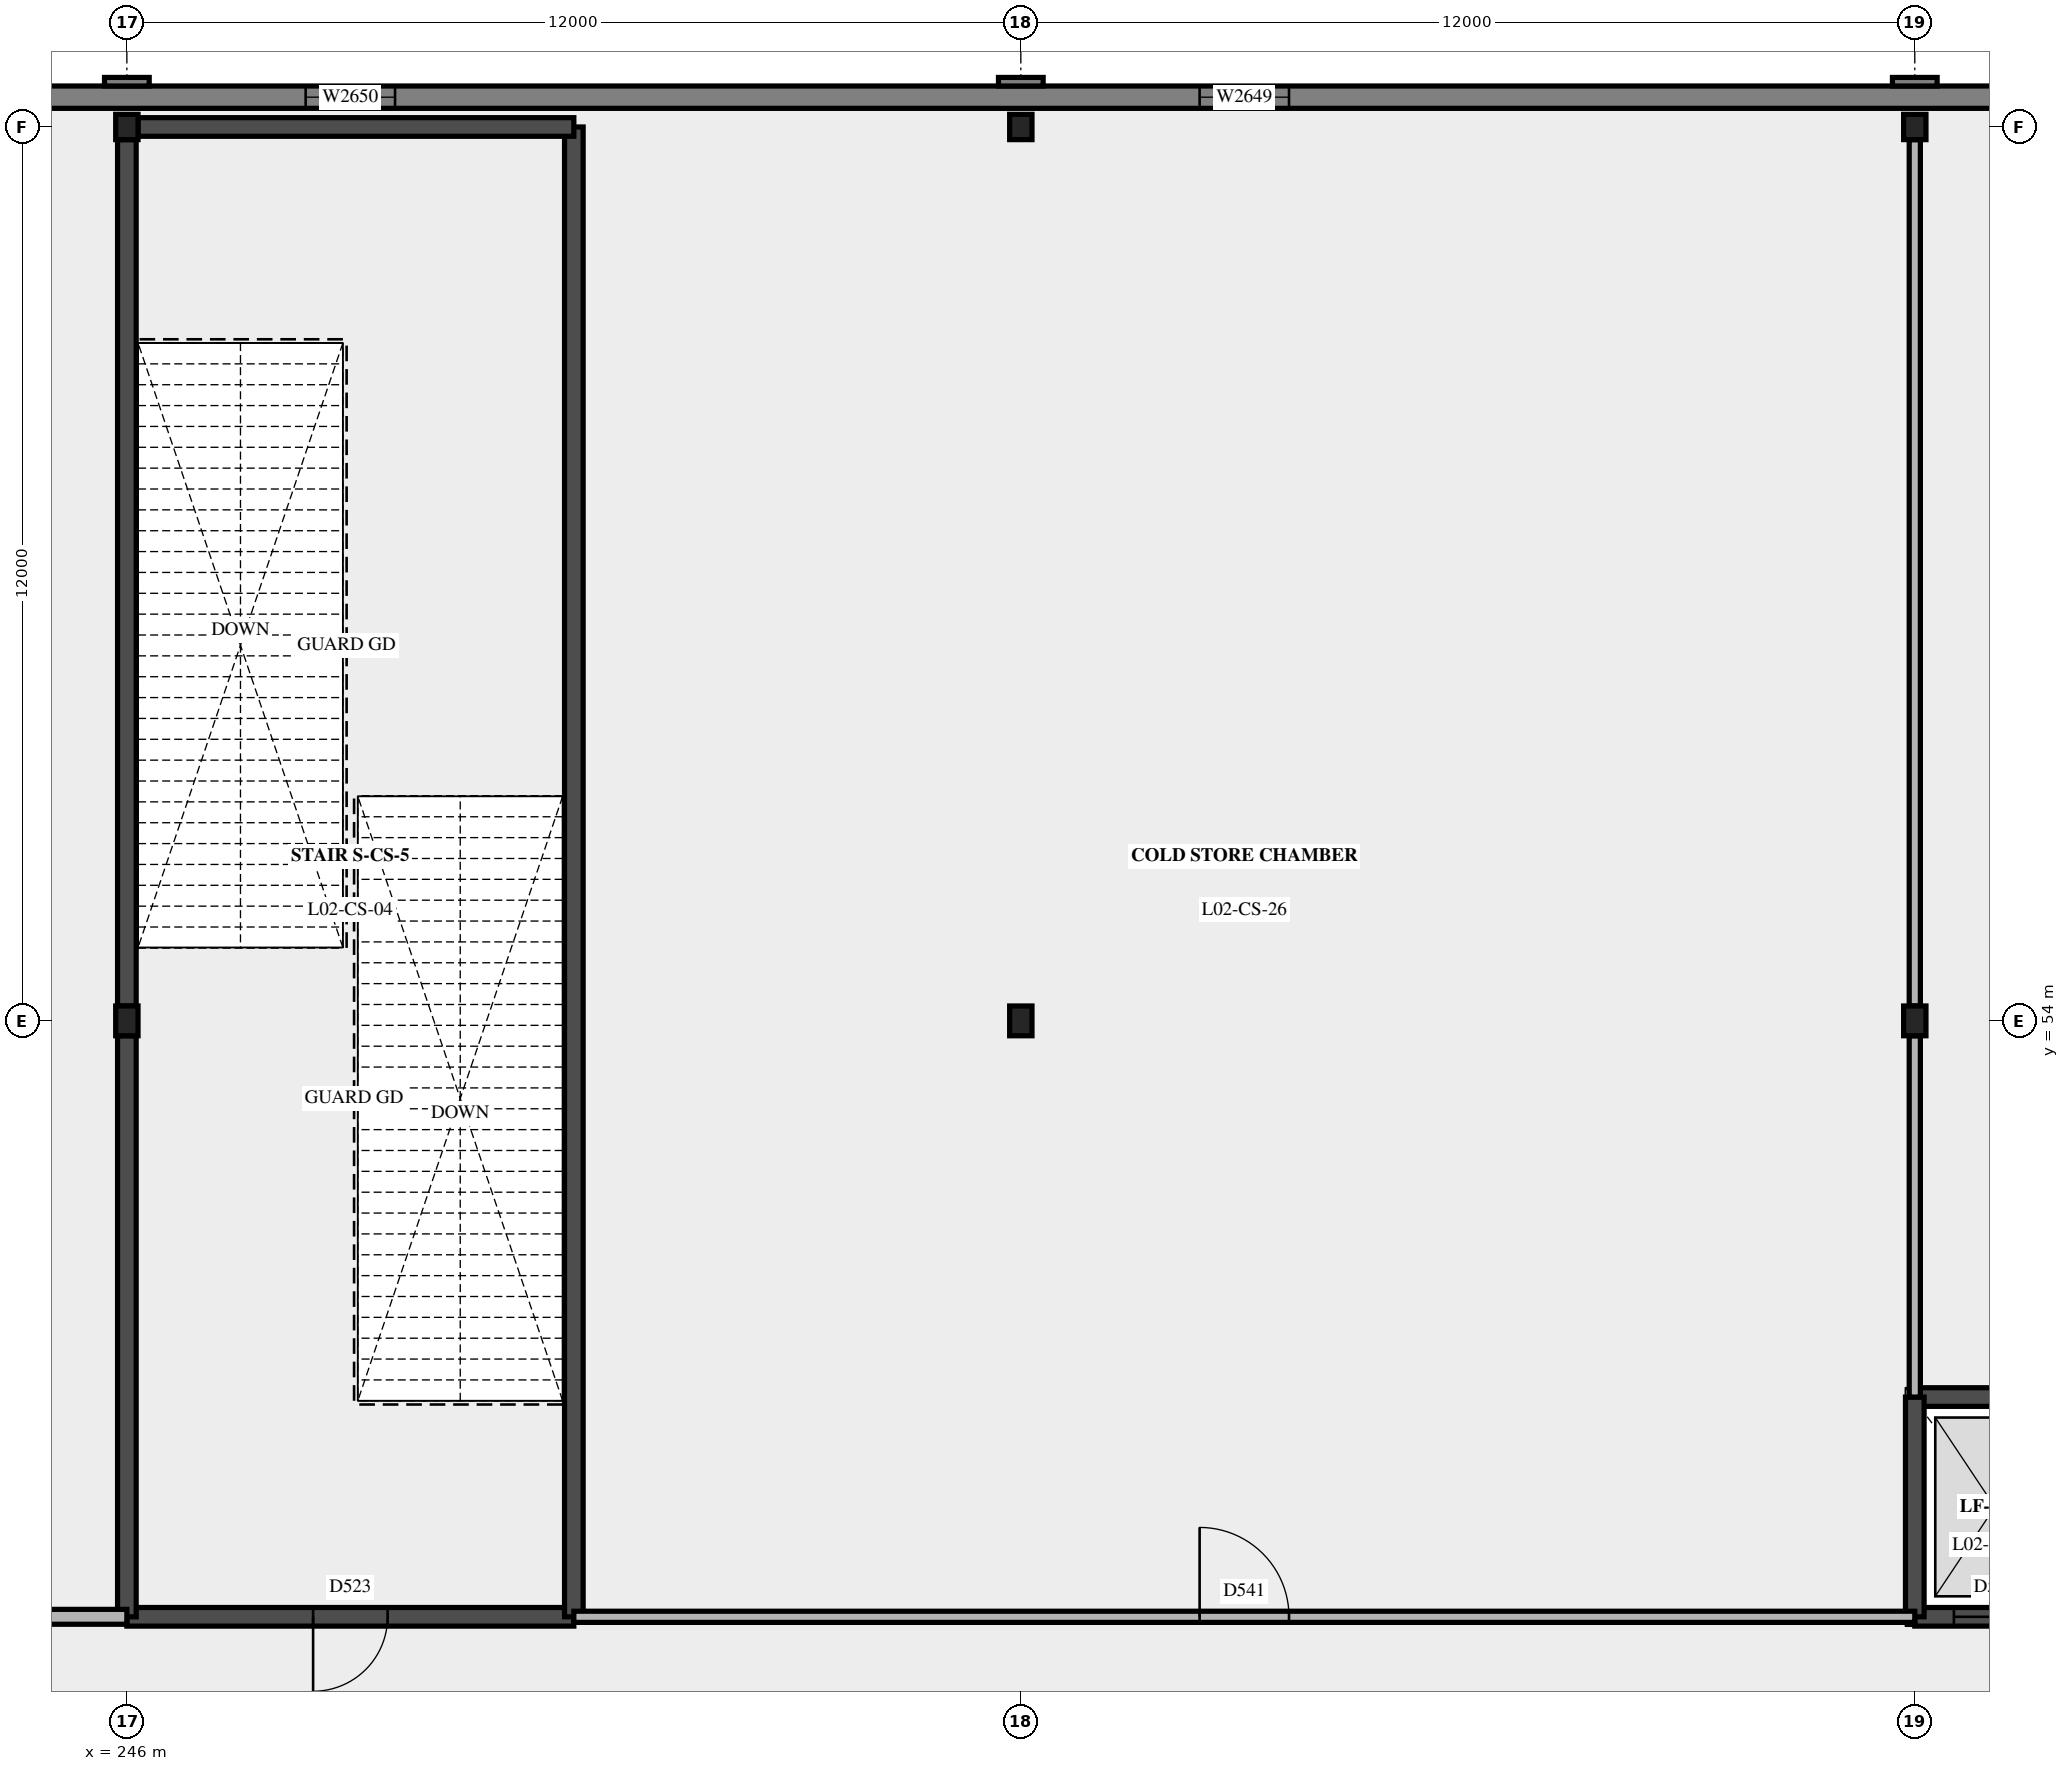
"""IFC4 building model, lengths in metres.
Left out: names, types, materials, properties, quantities, classifications, styles, units other than length and angle.
Written with IfcOpenShell. Run it as: python <this file> out.ifc"""

import sys

from ifc_helpers import new_model, si_unit, direction, frame, frame_2d, origin, origin_2d, place, context, subcontext, project, spatial, polyline, rectangle, i_section, outline, extrude, element, fill, save


model = new_model("IFC4")
c1 = context("Model", 3, precision=1e-05, world=origin(), true_north=direction((0.0, 1.0)))
c2 = subcontext(c1, "Body", "Model", "MODEL_VIEW")
j1 = project(units=[si_unit("LENGTHUNIT", "METRE"), si_unit("PLANEANGLEUNIT", "RADIAN")], contexts=[c1])
p1 = place(None, origin())
s1 = spatial("IfcSite", under=j1, at=p1, CompositionType="ELEMENT")
p2 = place(p1, origin())
s2 = spatial("IfcBuilding", under=s1, at=p2, CompositionType="ELEMENT")
p3 = place(p2, frame((0.0, 0.0, 10.8)))
s3 = spatial("IfcBuildingStorey", under=s2, at=p3, CompositionType="ELEMENT", Elevation=10.8)
p4 = place(p3, frame((246.0, 54.0, 0.0), z_axis=(0.0, 0.0, 1.0), x_axis=(1.0, 0.0, 0.0)))
e1 = element("IfcColumn", 1, at=p4, inside=s3, PredefinedType="COLUMN", context=c2, shape_type="SweptSolid", body=[
    extrude(i_section(OverallWidth=0.3, OverallDepth=0.4, WebThickness=0.013, FlangeThickness=0.024, at=origin_2d()), origin(), (0.0, 0.0, 1.0), 5.4),
])
p5 = place(p3, frame((246.0, 66.0, 0.0), z_axis=(0.0, 0.0, 1.0), x_axis=(1.0, 0.0, 0.0)))
e2 = element("IfcColumn", 2, at=p5, inside=s3, PredefinedType="COLUMN", context=c2, shape_type="SweptSolid", body=[
    extrude(i_section(OverallWidth=0.3, OverallDepth=0.34, WebThickness=0.012, FlangeThickness=0.021, at=origin_2d()), origin(), (0.0, 0.0, 1.0), 5.4),
])
p6 = place(p3, frame((258.0, 54.0, 0.0), z_axis=(0.0, 0.0, 1.0), x_axis=(1.0, 0.0, 0.0)))
e3 = element("IfcColumn", 3, at=p6, inside=s3, PredefinedType="COLUMN", context=c2, shape_type="SweptSolid", body=[
    extrude(i_section(OverallWidth=0.3, OverallDepth=0.4, WebThickness=0.013, FlangeThickness=0.024, at=origin_2d()), origin(), (0.0, 0.0, 1.0), 5.4),
])
p7 = place(p3, frame((258.0, 66.0, 0.0), z_axis=(0.0, 0.0, 1.0), x_axis=(1.0, 0.0, 0.0)))
e4 = element("IfcColumn", 4, at=p7, inside=s3, PredefinedType="COLUMN", context=c2, shape_type="SweptSolid", body=[
    extrude(i_section(OverallWidth=0.3, OverallDepth=0.34, WebThickness=0.012, FlangeThickness=0.021, at=origin_2d()), origin(), (0.0, 0.0, 1.0), 5.4),
])
p8 = place(p3, frame((270.0, 54.0, 0.0), z_axis=(0.0, 0.0, 1.0), x_axis=(1.0, 0.0, 0.0)))
e5 = element("IfcColumn", 5, at=p8, inside=s3, PredefinedType="COLUMN", context=c2, shape_type="SweptSolid", body=[
    extrude(i_section(OverallWidth=0.3, OverallDepth=0.4, WebThickness=0.013, FlangeThickness=0.024, at=origin_2d()), origin(), (0.0, 0.0, 1.0), 5.4),
])
p9 = place(p3, frame((270.0, 66.0, 0.0), z_axis=(0.0, 0.0, 1.0), x_axis=(1.0, 0.0, 0.0)))
e6 = element("IfcColumn", 6, at=p9, inside=s3, PredefinedType="COLUMN", context=c2, shape_type="SweptSolid", body=[
    extrude(i_section(OverallWidth=0.3, OverallDepth=0.34, WebThickness=0.012, FlangeThickness=0.021, at=origin_2d()), origin(), (0.0, 0.0, 1.0), 5.4),
])
p10 = place(p3, frame((246.0, 46.0, 0.0), z_axis=(0.0, 0.0, 1.0), x_axis=(1.0, 0.0, 0.0)))
e7 = element("IfcWall", 7, at=p10, inside=s3, PredefinedType="SHEAR", context=c2, shape_type="SweptSolid", body=[
    extrude(rectangle(XDim=6.0, YDim=0.25, at=frame_2d((3.0, 0.0))), origin(), (0.0, 0.0, 1.0), 5.15),
])
p11 = place(p10, frame((2.5, 0.0, 0.0)))
e8 = element("IfcOpeningElement", 8, at=p11, cuts=e7, PredefinedType="OPENING", context=c2, shape_type="SweptSolid", body=[
    extrude(rectangle(XDim=1.0, YDim=2.1, at=frame_2d((0.5, 1.05))), frame((0.0, 0.135, 0.0), z_axis=(0.0, -1.0, 0.0), x_axis=(1.0, 0.0, 0.0)), (0.0, 0.0, 1.0), 0.27),
])
p12 = place(p3, frame((252.0, 46.0, 0.0), z_axis=(0.0, 0.0, 1.0), x_axis=(0.0, 1.0, 0.0)))
e9 = element("IfcWall", 9, at=p12, inside=s3, PredefinedType="SHEAR", context=c2, shape_type="SweptSolid", body=[
    extrude(rectangle(XDim=20.0, YDim=0.25, at=frame_2d((10.0, 0.0))), origin(), (0.0, 0.0, 1.0), 5.15),
])
p13 = place(p3, frame((246.15, 66.0, 0.0), z_axis=(0.0, 0.0, 1.0), x_axis=(1.0, 0.0, 0.0)))
e10 = element("IfcWall", 10, at=p13, inside=s3, PredefinedType="SHEAR", context=c2, shape_type="SweptSolid", body=[
    extrude(rectangle(XDim=5.85, YDim=0.25, at=frame_2d((2.925, 0.0))), origin(), (0.0, 0.0, 1.0), 5.15),
])
p14 = place(p3, frame((246.0, 46.0, 0.0), z_axis=(0.0, 0.0, 1.0), x_axis=(0.0, 1.0, 0.0)))
e11 = element("IfcWall", 11, at=p14, inside=s3, PredefinedType="SHEAR", context=c2, shape_type="SweptSolid", body=[
    extrude(rectangle(XDim=7.8, YDim=0.25, at=frame_2d((3.9, 0.0))), origin(), (0.0, 0.0, 1.0), 5.15),
])
p15 = place(p3, frame((246.0, 54.2, 0.0), z_axis=(0.0, 0.0, 1.0), x_axis=(0.0, 1.0, 0.0)))
e12 = element("IfcWall", 12, at=p15, inside=s3, PredefinedType="SHEAR", context=c2, shape_type="SweptSolid", body=[
    extrude(rectangle(XDim=11.63, YDim=0.25, at=frame_2d((5.815, 0.0))), origin(), (0.0, 0.0, 1.0), 5.15),
])
p16 = place(p3, frame((282.25, 66.4, 0.0), z_axis=(0.0, 0.0, 1.0), x_axis=(-1.0, 0.0, 0.0)))
e13 = element("IfcWall", 13, at=p16, inside=s3, PredefinedType="SOLIDWALL", context=c2, shape_type="SweptSolid", body=[
    extrude(rectangle(XDim=84.5, YDim=0.3, at=frame_2d((42.25, 0.0))), origin(), (0.0, 0.0, 1.0), 5.4),
])
p17 = place(p16, frame((8.65, 0.0, 1.2)))
e14 = element("IfcOpeningElement", 14, at=p17, cuts=e13, PredefinedType="OPENING", context=c2, shape_type="SweptSolid", body=[
    extrude(rectangle(XDim=1.2, YDim=1.5, at=frame_2d((0.6, 0.75))), frame((0.0, 0.16, 0.0), z_axis=(0.0, -1.0, 0.0), x_axis=(1.0, 0.0, 0.0)), (0.0, 0.0, 1.0), 0.32),
])
p18 = place(p16, frame((20.65, 0.0, 1.2)))
e15 = element("IfcOpeningElement", 15, at=p18, cuts=e13, PredefinedType="OPENING", context=c2, shape_type="SweptSolid", body=[
    extrude(rectangle(XDim=1.2, YDim=1.5, at=frame_2d((0.6, 0.75))), frame((0.0, 0.16, 0.0), z_axis=(0.0, -1.0, 0.0), x_axis=(1.0, 0.0, 0.0)), (0.0, 0.0, 1.0), 0.32),
])
p19 = place(p16, frame((32.65, 0.0, 1.2)))
e16 = element("IfcOpeningElement", 16, at=p19, cuts=e13, PredefinedType="OPENING", context=c2, shape_type="SweptSolid", body=[
    extrude(rectangle(XDim=1.2, YDim=1.5, at=frame_2d((0.6, 0.75))), frame((0.0, 0.16, 0.0), z_axis=(0.0, -1.0, 0.0), x_axis=(1.0, 0.0, 0.0)), (0.0, 0.0, 1.0), 0.32),
])
p20 = place(p16, frame((44.65, 0.0, 1.2)))
e17 = element("IfcOpeningElement", 17, at=p20, cuts=e13, PredefinedType="OPENING", context=c2, shape_type="SweptSolid", body=[
    extrude(rectangle(XDim=1.2, YDim=1.5, at=frame_2d((0.6, 0.75))), frame((0.0, 0.16, 0.0), z_axis=(0.0, -1.0, 0.0), x_axis=(1.0, 0.0, 0.0)), (0.0, 0.0, 1.0), 0.32),
])
p21 = place(p16, frame((56.65, 0.0, 1.2)))
e18 = element("IfcOpeningElement", 18, at=p21, cuts=e13, PredefinedType="OPENING", context=c2, shape_type="SweptSolid", body=[
    extrude(rectangle(XDim=1.2, YDim=1.5, at=frame_2d((0.6, 0.75))), frame((0.0, 0.16, 0.0), z_axis=(0.0, -1.0, 0.0), x_axis=(1.0, 0.0, 0.0)), (0.0, 0.0, 1.0), 0.32),
])
p22 = place(p16, frame((68.65, 0.0, 1.2)))
e19 = element("IfcOpeningElement", 19, at=p22, cuts=e13, PredefinedType="OPENING", context=c2, shape_type="SweptSolid", body=[
    extrude(rectangle(XDim=1.2, YDim=1.5, at=frame_2d((0.6, 0.75))), frame((0.0, 0.16, 0.0), z_axis=(0.0, -1.0, 0.0), x_axis=(1.0, 0.0, 0.0)), (0.0, 0.0, 1.0), 0.32),
])
p23 = place(p16, frame((80.65, 0.0, 1.2)))
e20 = element("IfcOpeningElement", 20, at=p23, cuts=e13, PredefinedType="OPENING", context=c2, shape_type="SweptSolid", body=[
    extrude(rectangle(XDim=1.2, YDim=1.5, at=frame_2d((0.6, 0.75))), frame((0.0, 0.16, 0.0), z_axis=(0.0, -1.0, 0.0), x_axis=(1.0, 0.0, 0.0)), (0.0, 0.0, 1.0), 0.32),
])
for number, where, z_axis, x_axis in (
    (21, (270.3, 66.607, 0.0), (0.0, 0.0, 1.0), (-1.0, 0.0, 0.0)),
    (22, (258.3, 66.607, 0.0), (0.0, 0.0, 1.0), (-1.0, 0.0, 0.0)),
    (23, (246.3, 66.607, 0.0), (0.0, 0.0, 1.0), (-1.0, 0.0, 0.0)),
):
    element("IfcWall", number, at=place(p3, frame(where, z_axis=z_axis, x_axis=x_axis)), inside=s3, PredefinedType="SOLIDWALL", context=c2, shape_type="SweptSolid", body=[
        extrude(rectangle(XDim=0.6, YDim=0.115, at=frame_2d((0.3, 0.0))), origin(), (0.0, 0.0, 1.0), 5.4),
    ])
p24 = place(p3, frame((272.15, 48.95, 0.0), z_axis=(0.0, 0.0, 1.0), x_axis=(-1.0, 0.0, 0.0)))
e24 = element("IfcWall", 24, at=p24, inside=s3, PredefinedType="SHEAR", context=c2, shape_type="SweptSolid", body=[
    extrude(rectangle(XDim=2.15, YDim=0.25, at=frame_2d((1.075, 0.0))), origin(), (0.0, 0.0, 1.0), 5.15),
])
p25 = place(p3, frame((270.0, 46.0, 0.0), z_axis=(0.0, 0.0, 1.0), x_axis=(1.0, 0.0, 0.0)))
e25 = element("IfcWall", 25, at=p25, inside=s3, PredefinedType="SHEAR", context=c2, shape_type="SweptSolid", body=[
    extrude(rectangle(XDim=2.15, YDim=0.25, at=frame_2d((1.075, 0.0))), origin(), (0.0, 0.0, 1.0), 5.15),
])
p26 = place(p25, frame((0.525, 0.0, 0.0)))
e26 = element("IfcOpeningElement", 26, at=p26, cuts=e25, PredefinedType="OPENING", context=c2, shape_type="SweptSolid", body=[
    extrude(rectangle(XDim=1.1, YDim=2.1, at=frame_2d((0.55, 1.05))), frame((0.0, 0.135, 0.0), z_axis=(0.0, -1.0, 0.0), x_axis=(1.0, 0.0, 0.0)), (0.0, 0.0, 1.0), 0.27),
])
p27 = place(p3, frame((270.0, 48.95, 0.0), z_axis=(0.0, 0.0, 1.0), x_axis=(0.0, -1.0, 0.0)))
e27 = element("IfcWall", 27, at=p27, inside=s3, PredefinedType="SHEAR", context=c2, shape_type="SweptSolid", body=[
    extrude(rectangle(XDim=2.95, YDim=0.25, at=frame_2d((1.475, 0.0))), origin(), (0.0, 0.0, 1.0), 5.15),
])
p28 = place(p3, frame((228.0, 46.0, 0.0), z_axis=(0.0, 0.0, 1.0), x_axis=(1.0, 0.0, 0.0)))
e28 = element("IfcWall", 28, at=p28, inside=s3, PredefinedType="PARTITIONING", context=c2, shape_type="SweptSolid", body=[
    extrude(outline(polyline([(0.0, 0.0), (18.0, 0.0), (18.0, 5.15), (15.705, 5.15), (15.7, 4.63), (15.5, 4.63), (15.495, 5.15), (13.305, 5.15), (13.3, 4.63), (13.1, 4.63), (13.095, 5.15), (10.905, 5.15), (10.9, 4.63), (10.7, 4.63), (10.695, 5.15), (8.505, 5.15), (8.5, 4.63), (8.3, 4.63), (8.295, 5.15), (6.1, 5.15), (6.095, 4.68), (5.905, 4.68), (5.9, 5.15), (3.705, 5.15), (3.7, 4.63), (3.5, 4.63), (3.495, 5.15), (1.305, 5.15), (1.3, 4.63), (1.1, 4.63), (1.095, 5.15), (0.0, 5.15), (0.0, 0.0)])), frame((0.0, 0.1, 0.0), z_axis=(0.0, -1.0, 0.0), x_axis=(1.0, 0.0, 0.0)), (0.0, 0.0, 1.0), 0.2),
])
p29 = place(p28, frame((8.1, 0.0, 0.0)))
e29 = element("IfcOpeningElement", 29, at=p29, cuts=e28, PredefinedType="OPENING", context=c2, shape_type="SweptSolid", body=[
    extrude(rectangle(XDim=1.8, YDim=2.1, at=frame_2d((0.9, 1.05))), frame((0.0, 0.11, 0.0), z_axis=(0.0, -1.0, 0.0), x_axis=(1.0, 0.0, 0.0)), (0.0, 0.0, 1.0), 0.22),
])
p30 = place(p3, frame((252.0, 46.0, 0.0), z_axis=(0.0, 0.0, 1.0), x_axis=(1.0, 0.0, 0.0)))
e30 = element("IfcWall", 30, at=p30, inside=s3, PredefinedType="PARTITIONING", context=c2, shape_type="SweptSolid", body=[
    extrude(outline(polyline([(0.0, 0.0), (18.0, 0.0), (18.0, 5.15), (15.705, 5.15), (15.7, 4.63), (15.5, 4.63), (15.495, 5.15), (13.305, 5.15), (13.3, 4.63), (13.1, 4.63), (13.095, 5.15), (10.905, 5.15), (10.9, 4.63), (10.7, 4.63), (10.695, 5.15), (8.505, 5.15), (8.5, 4.63), (8.3, 4.63), (8.295, 5.15), (6.1, 5.15), (6.095, 4.68), (5.905, 4.68), (5.9, 5.15), (3.705, 5.15), (3.7, 4.63), (3.5, 4.63), (3.495, 5.15), (1.305, 5.15), (1.3, 4.63), (1.1, 4.63), (1.095, 5.15), (0.0, 5.15), (0.0, 0.0)])), frame((0.0, 0.075, 0.0), z_axis=(0.0, -1.0, 0.0), x_axis=(1.0, 0.0, 0.0)), (0.0, 0.0, 1.0), 0.15),
])
p31 = place(p30, frame((8.4, 0.0, 0.0)))
e31 = element("IfcOpeningElement", 31, at=p31, cuts=e30, PredefinedType="OPENING", context=c2, shape_type="SweptSolid", body=[
    extrude(rectangle(XDim=1.2, YDim=2.4, at=frame_2d((0.6, 1.2))), frame((0.0, 0.085, 0.0), z_axis=(0.0, -1.0, 0.0), x_axis=(1.0, 0.0, 0.0)), (0.0, 0.0, 1.0), 0.17),
])
p32 = place(p3, frame((270.0, 48.95, 0.0), z_axis=(0.0, 0.0, 1.0), x_axis=(0.0, 1.0, 0.0)))
e32 = element("IfcWall", 32, at=p32, inside=s3, PredefinedType="PARTITIONING", context=c2, shape_type="SweptSolid", body=[
    extrude(rectangle(XDim=4.85, YDim=0.15, at=frame_2d((2.425, 0.0))), origin(), (0.0, 0.0, 1.0), 4.68),
])
p33 = place(p3, frame((270.0, 54.2, 0.0), z_axis=(0.0, 0.0, 1.0), x_axis=(0.0, 1.0, 0.0)))
e33 = element("IfcWall", 33, at=p33, inside=s3, PredefinedType="PARTITIONING", context=c2, shape_type="SweptSolid", body=[
    extrude(rectangle(XDim=11.63, YDim=0.15, at=frame_2d((5.815, 0.0))), origin(), (0.0, 0.0, 1.0), 4.68),
])
p34 = place(p18, origin())
e34 = element("IfcWindow", 34, at=p34, inside=s3, PartitioningType="SINGLE_PANEL", PredefinedType="WINDOW", context=c2, shape_type="SweptSolid", body=[
    extrude(rectangle(XDim=1.2, YDim=1.5, at=frame_2d((0.6, 0.75))), frame((0.0, 0.03, 0.0), z_axis=(0.0, -1.0, 0.0), x_axis=(1.0, 0.0, 0.0)), (0.0, 0.0, 1.0), 0.06),
])
fill(e15, e34)
p35 = place(p19, origin())
e35 = element("IfcWindow", 35, at=p35, inside=s3, PartitioningType="SINGLE_PANEL", PredefinedType="WINDOW", context=c2, shape_type="SweptSolid", body=[
    extrude(rectangle(XDim=1.2, YDim=1.5, at=frame_2d((0.6, 0.75))), frame((0.0, 0.03, 0.0), z_axis=(0.0, -1.0, 0.0), x_axis=(1.0, 0.0, 0.0)), (0.0, 0.0, 1.0), 0.06),
])
fill(e16, e35)
p36 = place(p26, origin())
e36 = element("IfcDoor", 36, at=p36, inside=s3, OperationType="SLIDING_TO_LEFT", PredefinedType="DOOR", context=c2, shape_type="SweptSolid", body=[
    extrude(rectangle(XDim=1.1, YDim=2.1, at=frame_2d((0.55, 1.05))), frame((0.0, 0.025, 0.0), z_axis=(0.0, -1.0, 0.0), x_axis=(1.0, 0.0, 0.0)), (0.0, 0.0, 1.0), 0.05),
])
fill(e26, e36)
p37 = place(p11, origin())
e37 = element("IfcDoor", 37, at=p37, inside=s3, OperationType="SINGLE_SWING_RIGHT", PredefinedType="DOOR", context=c2, shape_type="SweptSolid", body=[
    extrude(rectangle(XDim=1.0, YDim=2.1, at=frame_2d((0.5, 1.05))), frame((0.0, 0.025, 0.0), z_axis=(0.0, -1.0, 0.0), x_axis=(1.0, 0.0, 0.0)), (0.0, 0.0, 1.0), 0.05),
])
fill(e8, e37)
p38 = place(p31, origin())
e38 = element("IfcDoor", 38, at=p38, inside=s3, OperationType="SINGLE_SWING_LEFT", PredefinedType="DOOR", context=c2, shape_type="SweptSolid", body=[
    extrude(rectangle(XDim=1.2, YDim=2.4, at=frame_2d((0.6, 1.2))), frame((0.0, 0.025, 0.0), z_axis=(0.0, -1.0, 0.0), x_axis=(1.0, 0.0, 0.0)), (0.0, 0.0, 1.0), 0.05),
])
fill(e31, e38)
save(model, sys.argv[1])
